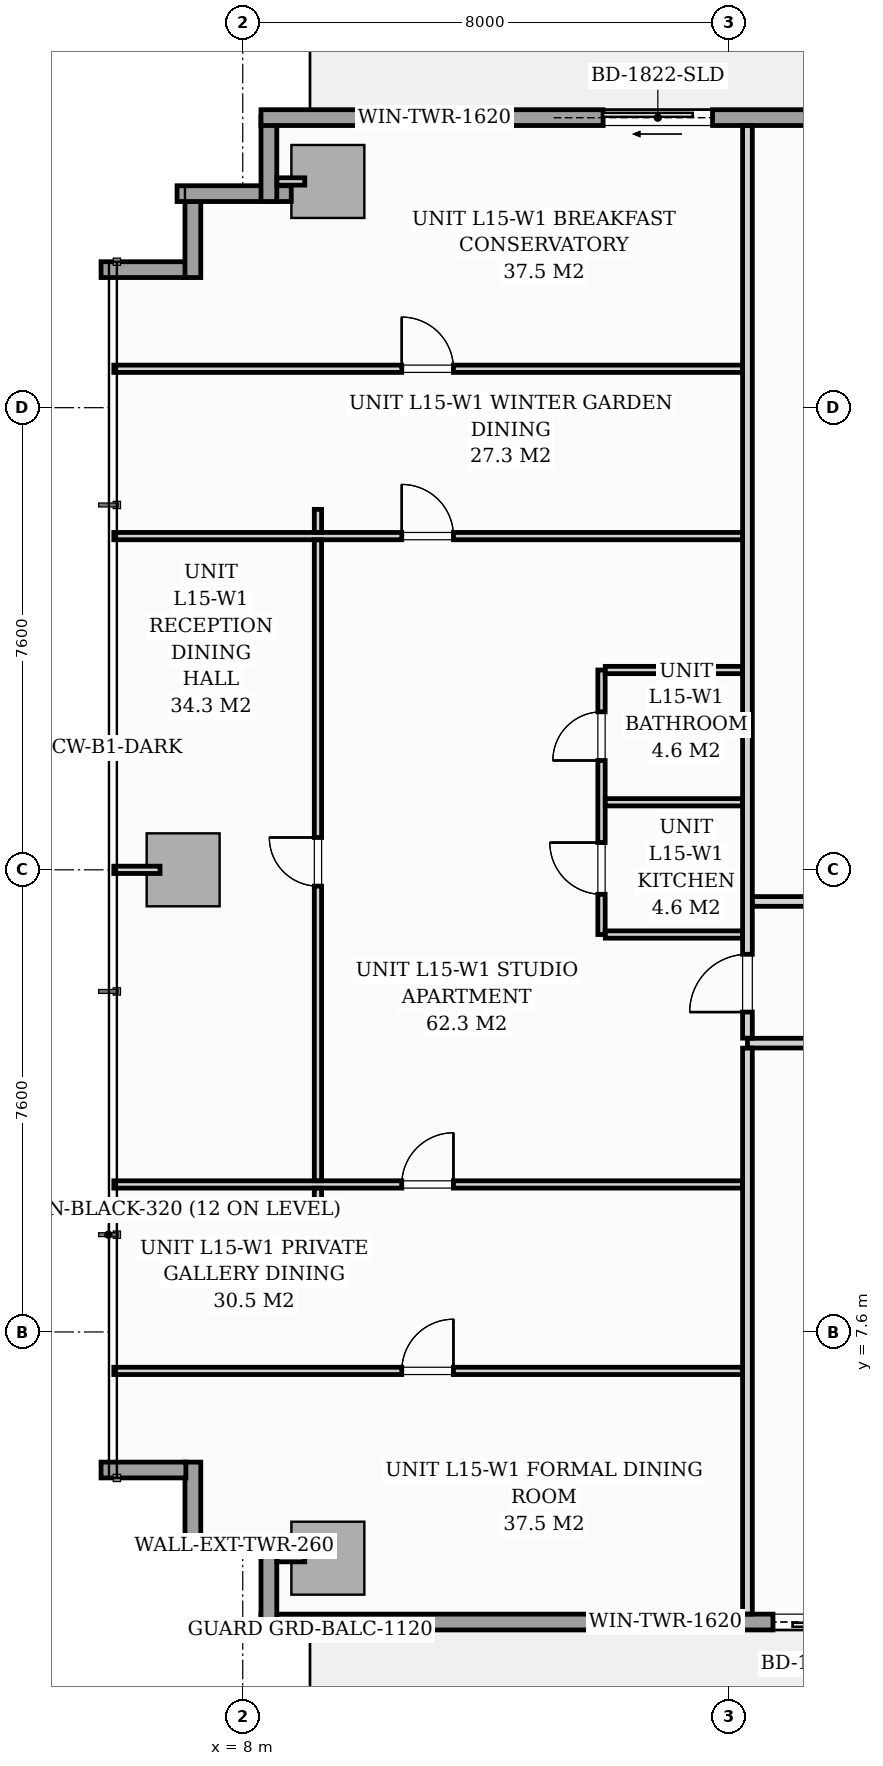
"""IFC4 building model, lengths in metres.
Left out: names, types, materials, properties, quantities, classifications, styles, units other than length and angle.
Written with IfcOpenShell. Run it as: python <this file> out.ifc"""

import sys

from ifc_helpers import new_model, si_unit, direction, frame, frame_2d, origin, origin_2d, place, context, subcontext, project, spatial, rectangle, extrude, source, transform, mapped, element, fill, save


model = new_model("IFC4")
c1 = context("Model", 3, precision=1e-05, world=origin(), true_north=direction((0.0, 1.0)))
c2 = subcontext(c1, "Body", "Model", "MODEL_VIEW")
j1 = project(units=[si_unit("LENGTHUNIT", "METRE"), si_unit("PLANEANGLEUNIT", "RADIAN")], contexts=[c1])
p1 = place(None, origin())
s1 = spatial("IfcSite", under=j1, at=p1, CompositionType="ELEMENT")
p2 = place(p1, origin())
s2 = spatial("IfcBuilding", under=s1, at=p2, CompositionType="ELEMENT")
p3 = place(p2, frame((0.0, 0.0, 55.0)))
s3 = spatial("IfcBuildingStorey", under=s2, at=p3, CompositionType="ELEMENT", Elevation=55.0)
m1 = source(origin(), c2, "Body", "SweptSolid", [
    extrude(rectangle(XDim=1.2, YDim=1.2, at=origin_2d()), origin(), (0.0, 0.0, 1.0), 3.196),
])
for number, where, z_axis, x_axis in (
    (1, (9.4, 3.88, 0.002), (0.0, 0.0, 1.0), (1.0, 0.0, 0.0)),
    (2, (9.4, 26.52, 0.002), (0.0, 0.0, 1.0), (1.0, 0.0, 0.0)),
    (3, (7.02, 15.2, 0.002), (0.0, 0.0, 1.0), (1.0, 0.0, 0.0)),
):
    element("IfcColumn", number, at=place(p3, frame(where, z_axis=z_axis, x_axis=x_axis)), inside=s3, PredefinedType="COLUMN", context=c2, shape_type="MappedRepresentation", body=[
        mapped(m1, transform((0.0, 0.0, 0.0), scale=1.0)),
    ])
p4 = place(p3, frame((8.798, 4.08, 0.0), z_axis=(0.0, 0.0, 1.0), x_axis=(-1.0, 0.0, 0.0)))
e4 = element("IfcWall", 4, at=p4, inside=s3, PredefinedType="STANDARD", context=c2, shape_type="SweptSolid", body=[
    extrude(rectangle(XDim=1.878, YDim=0.26, at=frame_2d((0.939, 0.0))), origin(), (0.0, 0.0, 1.0), 2.94),
])
for number, where, z_axis, x_axis in (
    (5, (7.18, 4.065, 0.0), (0.0, 0.0, 1.0), (0.0, 1.0, 0.0)),
    (6, (7.065, 5.33, 0.0), (0.0, 0.0, 1.0), (-1.0, 0.0, 0.0)),
    (7, (5.67, 25.07, 0.0), (0.0, 0.0, 1.0), (1.0, 0.0, 0.0)),
    (8, (7.18, 24.94, 0.0), (0.0, 0.0, 1.0), (0.0, 1.0, 0.0)),
):
    element("IfcWall", number, at=place(p3, frame(where, z_axis=z_axis, x_axis=x_axis)), inside=s3, PredefinedType="STANDARD", context=c2, shape_type="SweptSolid", body=[
        extrude(rectangle(XDim=1.395, YDim=0.26, at=frame_2d((0.698, 0.0))), origin(), (0.0, 0.0, 1.0), 2.94),
    ])
p5 = place(p3, frame((6.92, 26.32, 0.0), z_axis=(0.0, 0.0, 1.0), x_axis=(1.0, 0.0, 0.0)))
e9 = element("IfcWall", 9, at=p5, inside=s3, PredefinedType="STANDARD", context=c2, shape_type="SweptSolid", body=[
    extrude(rectangle(XDim=1.878, YDim=0.26, at=frame_2d((0.939, 0.0))), origin(), (0.0, 0.0, 1.0), 2.94),
])
p6 = place(p3, frame((8.43, 26.19, 0.0), z_axis=(0.0, 0.0, 1.0), x_axis=(0.0, 1.0, 0.0)))
e10 = element("IfcWall", 10, at=p6, inside=s3, PredefinedType="STANDARD", context=c2, shape_type="SweptSolid", body=[
    extrude(rectangle(XDim=1.395, YDim=0.26, at=frame_2d((0.698, 0.0))), origin(), (0.0, 0.0, 1.0), 2.94),
])
p7 = place(p3, frame((8.3, 27.57, 0.0), z_axis=(0.0, 0.0, 1.0), x_axis=(1.0, 0.0, 0.0)))
e11 = element("IfcWall", 11, at=p7, inside=s3, PredefinedType="STANDARD", context=c2, shape_type="SweptSolid", body=[
    extrude(rectangle(XDim=17.15, YDim=0.26, at=frame_2d((8.575, 0.0))), origin(), (0.0, 0.0, 1.0), 2.94),
])
p8 = place(p7, frame((5.626, 0.0, 0.0)))
e12 = element("IfcOpeningElement", 12, at=p8, cuts=e11, PredefinedType="OPENING", context=c2, shape_type="SweptSolid", body=[
    extrude(rectangle(XDim=1.8, YDim=2.06, at=frame_2d((0.9, 1.03))), frame((0.0, 0.14, 0.0), z_axis=(0.0, -1.0, 0.0), x_axis=(1.0, 0.0, 0.0)), (0.0, 0.0, 1.0), 0.28),
])
p9 = place(p7, frame((2.05, 0.0, 0.65)))
e13 = element("IfcOpeningElement", 13, at=p9, cuts=e11, PredefinedType="OPENING", context=c2, shape_type="SweptSolid", body=[
    extrude(rectangle(XDim=1.6, YDim=1.5, at=frame_2d((0.8, 0.75))), frame((0.0, 0.14, 0.0), z_axis=(0.0, -1.0, 0.0), x_axis=(1.0, 0.0, 0.0)), (0.0, 0.0, 1.0), 0.28),
])
p10 = place(p3, frame((25.45, 2.83, 0.0), z_axis=(0.0, 0.0, 1.0), x_axis=(-1.0, 0.0, 0.0)))
e14 = element("IfcWall", 14, at=p10, inside=s3, PredefinedType="STANDARD", context=c2, shape_type="SweptSolid", body=[
    extrude(rectangle(XDim=17.15, YDim=0.26, at=frame_2d((8.575, 0.0))), origin(), (0.0, 0.0, 1.0), 2.94),
])
p11 = place(p10, frame((6.93, 0.0, 0.0)))
e15 = element("IfcOpeningElement", 15, at=p11, cuts=e14, PredefinedType="OPENING", context=c2, shape_type="SweptSolid", body=[
    extrude(rectangle(XDim=1.8, YDim=2.06, at=frame_2d((0.9, 1.03))), frame((0.0, 0.14, 0.0), z_axis=(0.0, -1.0, 0.0), x_axis=(1.0, 0.0, 0.0)), (0.0, 0.0, 1.0), 0.28),
])
p12 = place(p10, frame((9.7, 0.0, 0.65)))
e16 = element("IfcOpeningElement", 16, at=p12, cuts=e14, PredefinedType="OPENING", context=c2, shape_type="SweptSolid", body=[
    extrude(rectangle(XDim=1.6, YDim=1.5, at=frame_2d((0.8, 0.75))), frame((0.0, 0.14, 0.0), z_axis=(0.0, -1.0, 0.0), x_axis=(1.0, 0.0, 0.0)), (0.0, 0.0, 1.0), 0.28),
])
p13 = place(p3, frame((8.43, 2.815, 0.0), z_axis=(0.0, 0.0, 1.0), x_axis=(0.0, 1.0, 0.0)))
e17 = element("IfcWall", 17, at=p13, inside=s3, PredefinedType="STANDARD", context=c2, shape_type="SweptSolid", body=[
    extrude(rectangle(XDim=1.395, YDim=0.26, at=frame_2d((0.698, 0.0))), origin(), (0.0, 0.0, 1.0), 2.94),
])
p14 = place(p3, frame((16.3, 12.35, 0.0), z_axis=(0.0, 0.0, 1.0), x_axis=(1.0, 0.0, 0.0)))
e18 = element("IfcWall", 18, at=p14, inside=s3, PredefinedType="PARTITIONING", context=c2, shape_type="SweptSolid", body=[
    extrude(rectangle(XDim=35.2, YDim=0.16, at=frame_2d((17.6, 0.0))), origin(), (0.0, 0.0, 1.0), 2.94),
])
p15 = place(p14, frame((6.307, 0.0, 0.0)))
e19 = element("IfcOpeningElement", 19, at=p15, cuts=e18, PredefinedType="OPENING", context=c2, shape_type="SweptSolid", body=[
    extrude(rectangle(XDim=0.95, YDim=2.06, at=frame_2d((0.475, 1.03))), frame((0.0, 0.09, 0.0), z_axis=(0.0, -1.0, 0.0), x_axis=(1.0, 0.0, 0.0)), (0.0, 0.0, 1.0), 0.18),
])
p16 = place(p14, frame((18.392, 0.0, 0.0)))
e20 = element("IfcOpeningElement", 20, at=p16, cuts=e18, PredefinedType="OPENING", context=c2, shape_type="SweptSolid", body=[
    extrude(rectangle(XDim=0.95, YDim=2.06, at=frame_2d((0.475, 1.03))), frame((0.0, 0.09, 0.0), z_axis=(0.0, -1.0, 0.0), x_axis=(1.0, 0.0, 0.0)), (0.0, 0.0, 1.0), 0.18),
])
p17 = place(p14, frame((29.304, 0.0, 0.0)))
e21 = element("IfcOpeningElement", 21, at=p17, cuts=e18, PredefinedType="OPENING", context=c2, shape_type="SweptSolid", body=[
    extrude(rectangle(XDim=0.95, YDim=2.06, at=frame_2d((0.475, 1.03))), frame((0.0, 0.09, 0.0), z_axis=(0.0, -1.0, 0.0), x_axis=(1.0, 0.0, 0.0)), (0.0, 0.0, 1.0), 0.18),
])
p18 = place(p3, frame((16.3, 2.962, 0.0), z_axis=(0.0, 0.0, 1.0), x_axis=(0.0, 1.0, 0.0)))
e22 = element("IfcWall", 22, at=p18, inside=s3, PredefinedType="PARTITIONING", context=c2, shape_type="SweptSolid", body=[
    extrude(rectangle(XDim=9.306, YDim=0.16, at=frame_2d((4.653, 0.0))), origin(), (0.0, 0.0, 1.0), 2.94),
])
p19 = place(p3, frame((16.3, 12.432, 0.0), z_axis=(0.0, 0.0, 1.0), x_axis=(0.0, 1.0, 0.0)))
e23 = element("IfcWall", 23, at=p19, inside=s3, PredefinedType="PARTITIONING", context=c2, shape_type="SweptSolid", body=[
    extrude(rectangle(XDim=15.006, YDim=0.16, at=frame_2d((7.503, 0.0))), origin(), (0.0, 0.0, 1.0), 2.94),
])
p20 = place(p19, frame((0.429, 0.0, 0.0)))
e24 = element("IfcOpeningElement", 24, at=p20, cuts=e23, PredefinedType="OPENING", context=c2, shape_type="SweptSolid", body=[
    extrude(rectangle(XDim=0.95, YDim=2.06, at=frame_2d((0.475, 1.03))), frame((0.0, 0.09, 0.0), z_axis=(0.0, -1.0, 0.0), x_axis=(1.0, 0.0, 0.0)), (0.0, 0.0, 1.0), 0.18),
])
p21 = place(p3, frame((13.9, 14.136, 0.0), z_axis=(0.0, 0.0, 1.0), x_axis=(0.0, 1.0, 0.0)))
e25 = element("IfcWall", 25, at=p21, inside=s3, PredefinedType="PARTITIONING", context=c2, shape_type="SweptSolid", body=[
    extrude(rectangle(XDim=4.35, YDim=0.12, at=frame_2d((2.175, 0.0))), origin(), (0.0, 0.0, 1.0), 2.94),
])
p22 = place(p21, frame((0.662, 0.0, 0.0)))
e26 = element("IfcOpeningElement", 26, at=p22, cuts=e25, PredefinedType="OPENING", context=c2, shape_type="SweptSolid", body=[
    extrude(rectangle(XDim=0.85, YDim=2.05, at=frame_2d((0.425, 1.025))), frame((0.0, 0.07, 0.0), z_axis=(0.0, -1.0, 0.0), x_axis=(1.0, 0.0, 0.0)), (0.0, 0.0, 1.0), 0.14),
])
p23 = place(p21, frame((2.862, 0.0, 0.0)))
e27 = element("IfcOpeningElement", 27, at=p23, cuts=e25, PredefinedType="OPENING", context=c2, shape_type="SweptSolid", body=[
    extrude(rectangle(XDim=0.8, YDim=2.02, at=frame_2d((0.4, 1.01))), frame((0.0, 0.07, 0.0), z_axis=(0.0, -1.0, 0.0), x_axis=(1.0, 0.0, 0.0)), (0.0, 0.0, 1.0), 0.14),
])
p24 = place(p3, frame((13.962, 16.311, 0.0), z_axis=(0.0, 0.0, 1.0), x_axis=(1.0, 0.0, 0.0)))
e28 = element("IfcWall", 28, at=p24, inside=s3, PredefinedType="PARTITIONING", context=c2, shape_type="SweptSolid", body=[
    extrude(rectangle(XDim=2.256, YDim=0.12, at=frame_2d((1.128, 0.0))), origin(), (0.0, 0.0, 1.0), 2.045),
])
for number, where, z_axis, x_axis in (
    (29, (13.962, 14.136, 0.0), (0.0, 0.0, 1.0), (1.0, 0.0, 0.0)),
    (30, (13.962, 18.486, 0.0), (0.0, 0.0, 1.0), (1.0, 0.0, 0.0)),
):
    element("IfcWall", number, at=place(p3, frame(where, z_axis=z_axis, x_axis=x_axis)), inside=s3, PredefinedType="PARTITIONING", context=c2, shape_type="SweptSolid", body=[
        extrude(rectangle(XDim=2.256, YDim=0.12, at=frame_2d((1.128, 0.0))), origin(), (0.0, 0.0, 1.0), 2.94),
    ])
p25 = place(p3, frame((5.88, 6.96, 0.0), z_axis=(0.0, 0.0, 1.0), x_axis=(1.0, 0.0, 0.0)))
e31 = element("IfcWall", 31, at=p25, inside=s3, PredefinedType="PARTITIONING", context=c2, shape_type="SweptSolid", body=[
    extrude(rectangle(XDim=10.338, YDim=0.12, at=frame_2d((5.169, 0.0))), origin(), (0.0, 0.0, 1.0), 2.94),
])
p26 = place(p25, frame((4.735, 0.0, 0.0)))
e32 = element("IfcOpeningElement", 32, at=p26, cuts=e31, PredefinedType="OPENING", context=c2, shape_type="SweptSolid", body=[
    extrude(rectangle(XDim=0.85, YDim=2.05, at=frame_2d((0.425, 1.025))), frame((0.0, 0.07, 0.0), z_axis=(0.0, -1.0, 0.0), x_axis=(1.0, 0.0, 0.0)), (0.0, 0.0, 1.0), 0.14),
])
p27 = place(p3, frame((5.88, 23.44, 0.0), z_axis=(0.0, 0.0, 1.0), x_axis=(1.0, 0.0, 0.0)))
e33 = element("IfcWall", 33, at=p27, inside=s3, PredefinedType="PARTITIONING", context=c2, shape_type="SweptSolid", body=[
    extrude(rectangle(XDim=10.338, YDim=0.12, at=frame_2d((5.169, 0.0))), origin(), (0.0, 0.0, 1.0), 2.94),
])
p28 = place(p27, frame((4.735, 0.0, 0.0)))
e34 = element("IfcOpeningElement", 34, at=p28, cuts=e33, PredefinedType="OPENING", context=c2, shape_type="SweptSolid", body=[
    extrude(rectangle(XDim=0.85, YDim=2.05, at=frame_2d((0.425, 1.025))), frame((0.0, 0.07, 0.0), z_axis=(0.0, -1.0, 0.0), x_axis=(1.0, 0.0, 0.0)), (0.0, 0.0, 1.0), 0.14),
])
p29 = place(p3, frame((5.88, 10.026, 0.0), z_axis=(0.0, 0.0, 1.0), x_axis=(1.0, 0.0, 0.0)))
e35 = element("IfcWall", 35, at=p29, inside=s3, PredefinedType="PARTITIONING", context=c2, shape_type="SweptSolid", body=[
    extrude(rectangle(XDim=10.338, YDim=0.12, at=frame_2d((5.169, 0.0))), origin(), (0.0, 0.0, 1.0), 2.94),
])
p30 = place(p29, frame((4.735, 0.0, 0.0)))
e36 = element("IfcOpeningElement", 36, at=p30, cuts=e35, PredefinedType="OPENING", context=c2, shape_type="SweptSolid", body=[
    extrude(rectangle(XDim=0.85, YDim=2.05, at=frame_2d((0.425, 1.025))), frame((0.0, 0.07, 0.0), z_axis=(0.0, -1.0, 0.0), x_axis=(1.0, 0.0, 0.0)), (0.0, 0.0, 1.0), 0.14),
])
p31 = place(p3, frame((5.88, 20.688, 0.0), z_axis=(0.0, 0.0, 1.0), x_axis=(1.0, 0.0, 0.0)))
e37 = element("IfcWall", 37, at=p31, inside=s3, PredefinedType="PARTITIONING", context=c2, shape_type="SweptSolid", body=[
    extrude(rectangle(XDim=10.338, YDim=0.12, at=frame_2d((5.169, 0.0))), origin(), (0.0, 0.0, 1.0), 2.94),
])
p32 = place(p31, frame((4.735, 0.0, 0.0)))
e38 = element("IfcOpeningElement", 38, at=p32, cuts=e37, PredefinedType="OPENING", context=c2, shape_type="SweptSolid", body=[
    extrude(rectangle(XDim=0.85, YDim=2.05, at=frame_2d((0.425, 1.025))), frame((0.0, 0.07, 0.0), z_axis=(0.0, -1.0, 0.0), x_axis=(1.0, 0.0, 0.0)), (0.0, 0.0, 1.0), 0.14),
])
p33 = place(p3, frame((9.237, 9.586, 0.0), z_axis=(0.0, 0.0, 1.0), x_axis=(0.0, 1.0, 0.0)))
e39 = element("IfcWall", 39, at=p33, inside=s3, PredefinedType="PARTITIONING", context=c2, shape_type="SweptSolid", body=[
    extrude(rectangle(XDim=0.378, YDim=0.12, at=frame_2d((0.189, 0.0))), origin(), (0.0, 0.0, 1.0), 2.94),
])
p34 = place(p3, frame((9.237, 10.088, 0.0), z_axis=(0.0, 0.0, 1.0), x_axis=(0.0, 1.0, 0.0)))
e40 = element("IfcWall", 40, at=p34, inside=s3, PredefinedType="PARTITIONING", context=c2, shape_type="SweptSolid", body=[
    extrude(rectangle(XDim=10.538, YDim=0.12, at=frame_2d((5.269, 0.0))), origin(), (0.0, 0.0, 1.0), 2.94),
])
p35 = place(p34, frame((4.844, 0.0, 0.0)))
e41 = element("IfcOpeningElement", 41, at=p35, cuts=e40, PredefinedType="OPENING", context=c2, shape_type="SweptSolid", body=[
    extrude(rectangle(XDim=0.8, YDim=2.0, at=frame_2d((0.4, 1.0))), frame((0.0, 0.07, 0.0), z_axis=(0.0, -1.0, 0.0), x_axis=(1.0, 0.0, 0.0)), (0.0, 0.0, 1.0), 0.14),
])
p36 = place(p3, frame((9.237, 20.75, 0.0), z_axis=(0.0, 0.0, 1.0), x_axis=(0.0, 1.0, 0.0)))
e42 = element("IfcWall", 42, at=p36, inside=s3, PredefinedType="PARTITIONING", context=c2, shape_type="SweptSolid", body=[
    extrude(rectangle(XDim=0.378, YDim=0.12, at=frame_2d((0.189, 0.0))), origin(), (0.0, 0.0, 1.0), 2.94),
])
p37 = place(p3, frame((16.382, 14.68, 0.0), z_axis=(0.0, 0.0, 1.0), x_axis=(1.0, 0.0, 0.0)))
e43 = element("IfcWall", 43, at=p37, inside=s3, PredefinedType="PARTITIONING", context=c2, shape_type="SweptSolid", body=[
    extrude(rectangle(XDim=9.778, YDim=0.16, at=frame_2d((4.889, 0.0))), origin(), (0.0, 0.0, 1.0), 2.94),
])
p38 = place(p37, frame((4.313, 0.0, 0.0)))
e44 = element("IfcOpeningElement", 44, at=p38, cuts=e43, PredefinedType="OPENING", context=c2, shape_type="SweptSolid", body=[
    extrude(rectangle(XDim=0.95, YDim=2.06, at=frame_2d((0.475, 1.03))), frame((0.0, 0.09, 0.0), z_axis=(0.0, -1.0, 0.0), x_axis=(1.0, 0.0, 0.0)), (0.0, 0.0, 1.0), 0.18),
])
for number, where, z_axis, x_axis in (
    (45, (9.02, 3.88, 0.0), (0.0, 0.0, 1.0), (-1.0, 0.0, 0.0)),
    (46, (9.02, 26.52, 0.0), (0.0, 0.0, 1.0), (-1.0, 0.0, 0.0)),
):
    element("IfcWall", number, at=place(p3, frame(where, z_axis=z_axis, x_axis=x_axis)), inside=s3, PredefinedType="PARTITIONING", context=c2, shape_type="SweptSolid", body=[
        extrude(rectangle(XDim=0.458, YDim=0.12, at=frame_2d((0.229, 0.0))), origin(), (0.0, 0.0, 1.0), 2.94),
    ])
p39 = place(p3, frame((6.64, 15.2, 0.0), z_axis=(0.0, 0.0, 1.0), x_axis=(-1.0, 0.0, 0.0)))
e47 = element("IfcWall", 47, at=p39, inside=s3, PredefinedType="PARTITIONING", context=c2, shape_type="SweptSolid", body=[
    extrude(rectangle(XDim=0.76, YDim=0.12, at=frame_2d((0.38, 0.0))), origin(), (0.0, 0.0, 1.0), 2.94),
])
m2 = source(origin(), c2, "Body", "SweptSolid", [
    extrude(rectangle(XDim=1.8, YDim=2.06, at=frame_2d((0.9, 1.03))), frame((0.0, 0.025, 0.0), z_axis=(0.0, -1.0, 0.0), x_axis=(1.0, 0.0, 0.0)), (0.0, 0.0, 1.0), 0.05),
])
p40 = place(p8, origin())
e48 = element("IfcDoor", 48, at=p40, inside=s3, OperationType="SLIDING_TO_LEFT", PredefinedType="DOOR", context=c2, shape_type="MappedRepresentation", body=[
    mapped(m2, transform((0.0, 0.0, 0.0), scale=1.0)),
])
fill(e12, e48)
m3 = source(origin(), c2, "Body", "SweptSolid", [
    extrude(rectangle(XDim=1.6, YDim=1.5, at=frame_2d((0.8, 0.75))), frame((0.0, 0.03, 0.0), z_axis=(0.0, -1.0, 0.0), x_axis=(1.0, 0.0, 0.0)), (0.0, 0.0, 1.0), 0.06),
])
p41 = place(p9, origin())
e49 = element("IfcWindow", 49, at=p41, inside=s3, PartitioningType="SINGLE_PANEL", PredefinedType="WINDOW", context=c2, shape_type="MappedRepresentation", body=[
    mapped(m3, transform((0.0, 0.0, 0.0), scale=1.0)),
])
fill(e13, e49)
p42 = place(p11, origin())
e50 = element("IfcDoor", 50, at=p42, inside=s3, OperationType="SLIDING_TO_LEFT", PredefinedType="DOOR", context=c2, shape_type="MappedRepresentation", body=[
    mapped(m2, transform((0.0, 0.0, 0.0), scale=1.0)),
])
fill(e15, e50)
p43 = place(p12, origin())
e51 = element("IfcWindow", 51, at=p43, inside=s3, PartitioningType="SINGLE_PANEL", PredefinedType="WINDOW", context=c2, shape_type="MappedRepresentation", body=[
    mapped(m3, transform((0.0, 0.0, 0.0), scale=1.0)),
])
fill(e16, e51)
m4 = source(origin(), c2, "Body", "SweptSolid", [
    extrude(rectangle(XDim=0.95, YDim=2.06, at=frame_2d((0.475, 1.03))), frame((0.0, 0.025, 0.0), z_axis=(0.0, -1.0, 0.0), x_axis=(1.0, 0.0, 0.0)), (0.0, 0.0, 1.0), 0.05),
])
p44 = place(p20, origin())
e52 = element("IfcDoor", 52, at=p44, inside=s3, OperationType="SINGLE_SWING_LEFT", PredefinedType="DOOR", context=c2, shape_type="MappedRepresentation", body=[
    mapped(m4, transform((0.0, 0.0, 0.0), scale=1.0)),
])
fill(e24, e52)
m5 = source(origin(), c2, "Body", "SweptSolid", [
    extrude(rectangle(XDim=0.85, YDim=2.05, at=frame_2d((0.425, 1.025))), frame((0.0, 0.025, 0.0), z_axis=(0.0, -1.0, 0.0), x_axis=(1.0, 0.0, 0.0)), (0.0, 0.0, 1.0), 0.05),
])
p45 = place(p22, origin())
e53 = element("IfcDoor", 53, at=p45, inside=s3, OperationType="SINGLE_SWING_RIGHT", PredefinedType="DOOR", context=c2, shape_type="MappedRepresentation", body=[
    mapped(m5, transform((0.0, 0.0, 0.0), scale=1.0)),
])
fill(e26, e53)
m6 = source(origin(), c2, "Body", "SweptSolid", [
    extrude(rectangle(XDim=0.8, YDim=2.02, at=frame_2d((0.4, 1.01))), frame((0.0, 0.025, 0.0), z_axis=(0.0, -1.0, 0.0), x_axis=(1.0, 0.0, 0.0)), (0.0, 0.0, 1.0), 0.05),
])
p46 = place(p23, origin())
e54 = element("IfcDoor", 54, at=p46, inside=s3, OperationType="SINGLE_SWING_LEFT", PredefinedType="DOOR", context=c2, shape_type="MappedRepresentation", body=[
    mapped(m6, transform((0.0, 0.0, 0.0), scale=1.0)),
])
fill(e27, e54)
p47 = place(p26, origin())
e55 = element("IfcDoor", 55, at=p47, inside=s3, OperationType="SINGLE_SWING_RIGHT", PredefinedType="DOOR", context=c2, shape_type="MappedRepresentation", body=[
    mapped(m5, transform((0.0, 0.0, 0.0), scale=1.0)),
])
fill(e32, e55)
p48 = place(p28, origin())
e56 = element("IfcDoor", 56, at=p48, inside=s3, OperationType="SINGLE_SWING_LEFT", PredefinedType="DOOR", context=c2, shape_type="MappedRepresentation", body=[
    mapped(m5, transform((0.0, 0.0, 0.0), scale=1.0)),
])
fill(e34, e56)
p49 = place(p30, origin())
e57 = element("IfcDoor", 57, at=p49, inside=s3, OperationType="SINGLE_SWING_RIGHT", PredefinedType="DOOR", context=c2, shape_type="MappedRepresentation", body=[
    mapped(m5, transform((0.0, 0.0, 0.0), scale=1.0)),
])
fill(e36, e57)
p50 = place(p32, origin())
e58 = element("IfcDoor", 58, at=p50, inside=s3, OperationType="SINGLE_SWING_LEFT", PredefinedType="DOOR", context=c2, shape_type="MappedRepresentation", body=[
    mapped(m5, transform((0.0, 0.0, 0.0), scale=1.0)),
])
fill(e38, e58)
m7 = source(origin(), c2, "Body", "SweptSolid", [
    extrude(rectangle(XDim=0.8, YDim=2.0, at=frame_2d((0.4, 1.0))), frame((0.0, 0.025, 0.0), z_axis=(0.0, -1.0, 0.0), x_axis=(1.0, 0.0, 0.0)), (0.0, 0.0, 1.0), 0.05),
])
p51 = place(p35, origin())
e59 = element("IfcDoor", 59, at=p51, inside=s3, OperationType="SINGLE_SWING_RIGHT", PredefinedType="DOOR", context=c2, shape_type="MappedRepresentation", body=[
    mapped(m7, transform((0.0, 0.0, 0.0), scale=1.0)),
])
fill(e41, e59)
save(model, sys.argv[1])
